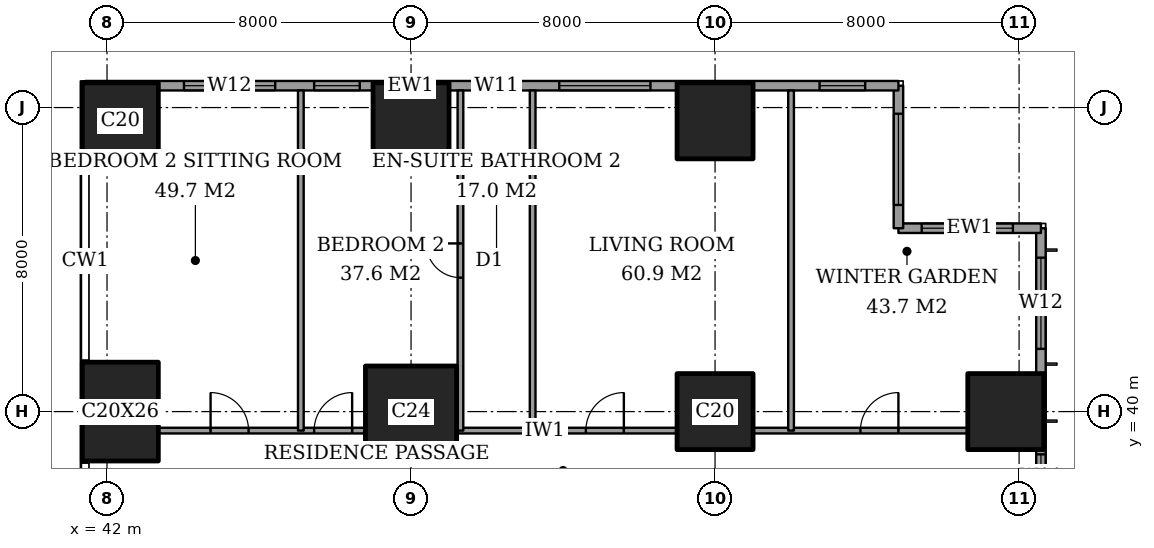
"""IFC4 building model, lengths in metres.
Left out: names, types, materials, properties, quantities, classifications, styles, units other than length and angle.
Written with IfcOpenShell. Run it as: python <this file> out.ifc"""

import sys

from ifc_helpers import new_model, si_unit, direction, frame, frame_2d, origin, origin_2d, place, context, subcontext, project, spatial, rectangle, extrude, element, fill, save


model = new_model("IFC4")
c1 = context("Model", 3, precision=1e-05, world=origin(), true_north=direction((0.0, 1.0)))
c2 = subcontext(c1, "Body", "Model", "MODEL_VIEW")
j1 = project(units=[si_unit("LENGTHUNIT", "METRE"), si_unit("PLANEANGLEUNIT", "RADIAN")], contexts=[c1])
p1 = place(None, origin())
s1 = spatial("IfcSite", under=j1, at=p1, CompositionType="ELEMENT")
p2 = place(p1, origin())
s2 = spatial("IfcBuilding", under=s1, at=p2, CompositionType="ELEMENT")
p3 = place(p2, frame((0.0, 0.0, 103.4)))
s3 = spatial("IfcBuildingStorey", under=s2, at=p3, CompositionType="ELEMENT", Elevation=103.4)
p4 = place(p3, frame((42.35, 40.0, 0.0), z_axis=(0.0, 0.0, 1.0), x_axis=(1.0, 0.0, 0.0)))
e1 = element("IfcColumn", 1, at=p4, inside=s3, PredefinedType="COLUMN", context=c2, shape_type="SweptSolid", body=[
    extrude(rectangle(XDim=2.0, YDim=2.6, at=origin_2d()), origin(), (0.0, 0.0, 1.0), 3.6),
])
p5 = place(p3, frame((42.35, 47.65, 0.0), z_axis=(0.0, 0.0, 1.0), x_axis=(1.0, 0.0, 0.0)))
e2 = element("IfcColumn", 2, at=p5, inside=s3, PredefinedType="COLUMN", context=c2, shape_type="SweptSolid", body=[
    extrude(rectangle(XDim=2.0, YDim=2.0, at=origin_2d()), origin(), (0.0, 0.0, 1.0), 3.6),
])
p6 = place(p3, frame((50.0, 40.0, 0.0), z_axis=(0.0, 0.0, 1.0), x_axis=(1.0, 0.0, 0.0)))
e3 = element("IfcColumn", 3, at=p6, inside=s3, PredefinedType="COLUMN", context=c2, shape_type="SweptSolid", body=[
    extrude(rectangle(XDim=2.4, YDim=2.4, at=origin_2d()), origin(), (0.0, 0.0, 1.0), 3.6),
])
for number, where, z_axis, x_axis in (
    (4, (50.0, 47.65, 0.0), (0.0, 0.0, 1.0), (1.0, 0.0, 0.0)),
    (5, (58.0, 40.0, 0.0), (0.0, 0.0, 1.0), (1.0, 0.0, 0.0)),
    (6, (58.0, 47.65, 0.0), (0.0, 0.0, 1.0), (1.0, 0.0, 0.0)),
    (7, (65.65, 40.0, 0.0), (0.0, 0.0, 1.0), (1.0, 0.0, 0.0)),
):
    element("IfcColumn", number, at=place(p3, frame(where, z_axis=z_axis, x_axis=x_axis)), inside=s3, PredefinedType="COLUMN", context=c2, shape_type="SweptSolid", body=[
        extrude(rectangle(XDim=2.0, YDim=2.0, at=origin_2d()), origin(), (0.0, 0.0, 1.0), 3.6),
    ])
p7 = place(p3, frame((66.575, 3.175, 0.0), z_axis=(0.0, 0.0, 1.0), x_axis=(0.0, 1.0, 0.0)))
e8 = element("IfcWall", 8, at=p7, inside=s3, PredefinedType="SOLIDWALL", context=c2, shape_type="SweptSolid", body=[
    extrude(rectangle(XDim=41.65, YDim=0.25, at=frame_2d((20.825, 0.0))), origin(), (0.0, 0.0, 1.0), 3.6),
])
p8 = place(p7, frame((0.775, 0.0, 0.4)))
e9 = element("IfcOpeningElement", 9, at=p8, cuts=e8, PredefinedType="OPENING", context=c2, shape_type="SweptSolid", body=[
    extrude(rectangle(XDim=2.4, YDim=2.2, at=frame_2d((1.2, 1.1))), frame((0.0, 0.135, 0.0), z_axis=(0.0, -1.0, 0.0), x_axis=(1.0, 0.0, 0.0)), (0.0, 0.0, 1.0), 0.27),
])
p9 = place(p7, frame((6.1, 0.0, 0.4)))
e10 = element("IfcOpeningElement", 10, at=p9, cuts=e8, PredefinedType="OPENING", context=c2, shape_type="SweptSolid", body=[
    extrude(rectangle(XDim=1.2, YDim=2.2, at=frame_2d((0.6, 1.1))), frame((0.0, 0.135, 0.0), z_axis=(0.0, -1.0, 0.0), x_axis=(1.0, 0.0, 0.0)), (0.0, 0.0, 1.0), 0.27),
])
p10 = place(p7, frame((8.275, 0.0, 0.4)))
e11 = element("IfcOpeningElement", 11, at=p10, cuts=e8, PredefinedType="OPENING", context=c2, shape_type="SweptSolid", body=[
    extrude(rectangle(XDim=2.4, YDim=2.2, at=frame_2d((1.2, 1.1))), frame((0.0, 0.135, 0.0), z_axis=(0.0, -1.0, 0.0), x_axis=(1.0, 0.0, 0.0)), (0.0, 0.0, 1.0), 0.27),
])
p11 = place(p7, frame((15.775, 0.0, 0.4)))
e12 = element("IfcOpeningElement", 12, at=p11, cuts=e8, PredefinedType="OPENING", context=c2, shape_type="SweptSolid", body=[
    extrude(rectangle(XDim=2.4, YDim=2.2, at=frame_2d((1.2, 1.1))), frame((0.0, 0.135, 0.0), z_axis=(0.0, -1.0, 0.0), x_axis=(1.0, 0.0, 0.0)), (0.0, 0.0, 1.0), 0.27),
])
p12 = place(p7, frame((23.475, 0.0, 0.4)))
e13 = element("IfcOpeningElement", 13, at=p12, cuts=e8, PredefinedType="OPENING", context=c2, shape_type="SweptSolid", body=[
    extrude(rectangle(XDim=2.4, YDim=2.2, at=frame_2d((1.2, 1.1))), frame((0.0, 0.135, 0.0), z_axis=(0.0, -1.0, 0.0), x_axis=(1.0, 0.0, 0.0)), (0.0, 0.0, 1.0), 0.27),
])
p13 = place(p7, frame((30.975, 0.0, 0.4)))
e14 = element("IfcOpeningElement", 14, at=p13, cuts=e8, PredefinedType="OPENING", context=c2, shape_type="SweptSolid", body=[
    extrude(rectangle(XDim=2.4, YDim=2.2, at=frame_2d((1.2, 1.1))), frame((0.0, 0.135, 0.0), z_axis=(0.0, -1.0, 0.0), x_axis=(1.0, 0.0, 0.0)), (0.0, 0.0, 1.0), 0.27),
])
p14 = place(p7, frame((34.5, 0.0, 0.4)))
e15 = element("IfcOpeningElement", 15, at=p14, cuts=e8, PredefinedType="OPENING", context=c2, shape_type="SweptSolid", body=[
    extrude(rectangle(XDim=1.2, YDim=2.2, at=frame_2d((0.6, 1.1))), frame((0.0, 0.135, 0.0), z_axis=(0.0, -1.0, 0.0), x_axis=(1.0, 0.0, 0.0)), (0.0, 0.0, 1.0), 0.27),
])
p15 = place(p7, frame((38.475, 0.0, 0.4)))
e16 = element("IfcOpeningElement", 16, at=p15, cuts=e8, PredefinedType="OPENING", context=c2, shape_type="SweptSolid", body=[
    extrude(rectangle(XDim=2.4, YDim=2.2, at=frame_2d((1.2, 1.1))), frame((0.0, 0.135, 0.0), z_axis=(0.0, -1.0, 0.0), x_axis=(1.0, 0.0, 0.0)), (0.0, 0.0, 1.0), 0.27),
])
p16 = place(p3, frame((66.575, 44.825, 0.0), z_axis=(0.0, 0.0, 1.0), x_axis=(-1.0, 0.0, 0.0)))
e17 = element("IfcWall", 17, at=p16, inside=s3, PredefinedType="SOLIDWALL", context=c2, shape_type="SweptSolid", body=[
    extrude(rectangle(XDim=3.75, YDim=0.25, at=frame_2d((1.875, 0.0))), origin(), (0.0, 0.0, 1.0), 3.6),
])
p17 = place(p16, frame((0.738, 0.0, 0.4)))
e18 = element("IfcOpeningElement", 18, at=p17, cuts=e17, PredefinedType="OPENING", context=c2, shape_type="SweptSolid", body=[
    extrude(rectangle(XDim=2.4, YDim=2.2, at=frame_2d((1.2, 1.1))), frame((0.0, 0.135, 0.0), z_axis=(0.0, -1.0, 0.0), x_axis=(1.0, 0.0, 0.0)), (0.0, 0.0, 1.0), 0.27),
])
p18 = place(p3, frame((62.825, 44.825, 0.0), z_axis=(0.0, 0.0, 1.0), x_axis=(0.0, 1.0, 0.0)))
e19 = element("IfcWall", 19, at=p18, inside=s3, PredefinedType="SOLIDWALL", context=c2, shape_type="SweptSolid", body=[
    extrude(rectangle(XDim=3.75, YDim=0.25, at=frame_2d((1.875, 0.0))), origin(), (0.0, 0.0, 1.0), 3.6),
])
p19 = place(p18, frame((0.613, 0.0, 0.4)))
e20 = element("IfcOpeningElement", 20, at=p19, cuts=e19, PredefinedType="OPENING", context=c2, shape_type="SweptSolid", body=[
    extrude(rectangle(XDim=2.4, YDim=2.2, at=frame_2d((1.2, 1.1))), frame((0.0, 0.135, 0.0), z_axis=(0.0, -1.0, 0.0), x_axis=(1.0, 0.0, 0.0)), (0.0, 0.0, 1.0), 0.27),
])
p20 = place(p3, frame((62.825, 48.575, 0.0), z_axis=(0.0, 0.0, 1.0), x_axis=(-1.0, 0.0, 0.0)))
e21 = element("IfcWall", 21, at=p20, inside=s3, PredefinedType="SOLIDWALL", context=c2, shape_type="SweptSolid", body=[
    extrude(rectangle(XDim=21.4, YDim=0.25, at=frame_2d((10.7, 0.0))), origin(), (0.0, 0.0, 1.0), 3.6),
])
p21 = place(p20, frame((0.875, 0.0, 0.4)))
e22 = element("IfcOpeningElement", 22, at=p21, cuts=e21, PredefinedType="OPENING", context=c2, shape_type="SweptSolid", body=[
    extrude(rectangle(XDim=1.2, YDim=2.2, at=frame_2d((0.6, 1.1))), frame((0.0, 0.135, 0.0), z_axis=(0.0, -1.0, 0.0), x_axis=(1.0, 0.0, 0.0)), (0.0, 0.0, 1.0), 0.27),
])
p22 = place(p20, frame((6.525, 0.0, 0.4)))
e23 = element("IfcOpeningElement", 23, at=p22, cuts=e21, PredefinedType="OPENING", context=c2, shape_type="SweptSolid", body=[
    extrude(rectangle(XDim=2.4, YDim=2.2, at=frame_2d((1.2, 1.1))), frame((0.0, 0.135, 0.0), z_axis=(0.0, -1.0, 0.0), x_axis=(1.0, 0.0, 0.0)), (0.0, 0.0, 1.0), 0.27),
])
p23 = place(p20, frame((9.975, 0.0, 0.4)))
e24 = element("IfcOpeningElement", 24, at=p23, cuts=e21, PredefinedType="OPENING", context=c2, shape_type="SweptSolid", body=[
    extrude(rectangle(XDim=1.2, YDim=2.2, at=frame_2d((0.6, 1.1))), frame((0.0, 0.135, 0.0), z_axis=(0.0, -1.0, 0.0), x_axis=(1.0, 0.0, 0.0)), (0.0, 0.0, 1.0), 0.27),
])
p24 = place(p20, frame((14.175, 0.0, 0.4)))
e25 = element("IfcOpeningElement", 25, at=p24, cuts=e21, PredefinedType="OPENING", context=c2, shape_type="SweptSolid", body=[
    extrude(rectangle(XDim=1.2, YDim=2.2, at=frame_2d((0.6, 1.1))), frame((0.0, 0.135, 0.0), z_axis=(0.0, -1.0, 0.0), x_axis=(1.0, 0.0, 0.0)), (0.0, 0.0, 1.0), 0.27),
])
p25 = place(p20, frame((16.4, 0.0, 0.4)))
e26 = element("IfcOpeningElement", 26, at=p25, cuts=e21, PredefinedType="OPENING", context=c2, shape_type="SweptSolid", body=[
    extrude(rectangle(XDim=2.4, YDim=2.2, at=frame_2d((1.2, 1.1))), frame((0.0, 0.135, 0.0), z_axis=(0.0, -1.0, 0.0), x_axis=(1.0, 0.0, 0.0)), (0.0, 0.0, 1.0), 0.27),
])
p26 = place(p3, frame((43.35, 39.5, 0.0), z_axis=(0.0, 0.0, 1.0), x_axis=(1.0, 0.0, 0.0)))
e27 = element("IfcWall", 27, at=p26, inside=s3, PredefinedType="PARTITIONING", context=c2, shape_type="SweptSolid", body=[
    extrude(rectangle(XDim=5.45, YDim=0.15, at=frame_2d((2.725, 0.0))), origin(), (0.0, 0.0, 1.0), 3.35),
])
p27 = place(p26, frame((4.1, 0.0, 0.0)))
e28 = element("IfcOpeningElement", 28, at=p27, cuts=e27, PredefinedType="OPENING", context=c2, shape_type="SweptSolid", body=[
    extrude(rectangle(XDim=1.0, YDim=2.1, at=frame_2d((0.5, 1.05))), frame((0.0, 0.085, 0.0), z_axis=(0.0, -1.0, 0.0), x_axis=(1.0, 0.0, 0.0)), (0.0, 0.0, 1.0), 0.17),
])
p28 = place(p26, frame((1.375, 0.0, 0.0)))
e29 = element("IfcOpeningElement", 29, at=p28, cuts=e27, PredefinedType="OPENING", context=c2, shape_type="SweptSolid", body=[
    extrude(rectangle(XDim=1.0, YDim=2.1, at=frame_2d((0.5, 1.05))), frame((0.0, 0.085, 0.0), z_axis=(0.0, -1.0, 0.0), x_axis=(1.0, 0.0, 0.0)), (0.0, 0.0, 1.0), 0.17),
])
p29 = place(p3, frame((51.2, 39.5, 0.0), z_axis=(0.0, 0.0, 1.0), x_axis=(1.0, 0.0, 0.0)))
e30 = element("IfcWall", 30, at=p29, inside=s3, PredefinedType="PARTITIONING", context=c2, shape_type="SweptSolid", body=[
    extrude(rectangle(XDim=5.8, YDim=0.15, at=frame_2d((2.9, 0.0))), origin(), (0.0, 0.0, 1.0), 3.35),
])
p30 = place(p29, frame((3.4, 0.0, 0.0)))
e31 = element("IfcOpeningElement", 31, at=p30, cuts=e30, PredefinedType="OPENING", context=c2, shape_type="SweptSolid", body=[
    extrude(rectangle(XDim=1.0, YDim=2.1, at=frame_2d((0.5, 1.05))), frame((0.0, 0.085, 0.0), z_axis=(0.0, -1.0, 0.0), x_axis=(1.0, 0.0, 0.0)), (0.0, 0.0, 1.0), 0.17),
])
p31 = place(p3, frame((59.0, 39.5, 0.0), z_axis=(0.0, 0.0, 1.0), x_axis=(1.0, 0.0, 0.0)))
e32 = element("IfcWall", 32, at=p31, inside=s3, PredefinedType="PARTITIONING", context=c2, shape_type="SweptSolid", body=[
    extrude(rectangle(XDim=5.65, YDim=0.15, at=frame_2d((2.825, 0.0))), origin(), (0.0, 0.0, 1.0), 3.35),
])
p32 = place(p31, frame((2.825, 0.0, 0.0)))
e33 = element("IfcOpeningElement", 33, at=p32, cuts=e32, PredefinedType="OPENING", context=c2, shape_type="SweptSolid", body=[
    extrude(rectangle(XDim=1.0, YDim=2.1, at=frame_2d((0.5, 1.05))), frame((0.0, 0.085, 0.0), z_axis=(0.0, -1.0, 0.0), x_axis=(1.0, 0.0, 0.0)), (0.0, 0.0, 1.0), 0.17),
])
p33 = place(p3, frame((47.1, 39.5, 0.0), z_axis=(0.0, 0.0, 1.0), x_axis=(0.0, 1.0, 0.0)))
e34 = element("IfcWall", 34, at=p33, inside=s3, PredefinedType="PARTITIONING", context=c2, shape_type="SweptSolid", body=[
    extrude(rectangle(XDim=8.95, YDim=0.15, at=frame_2d((4.475, 0.0))), origin(), (0.0, 0.0, 1.0), 3.35),
])
p34 = place(p3, frame((51.3, 39.5, 0.0), z_axis=(0.0, 0.0, 1.0), x_axis=(0.0, 1.0, 0.0)))
e35 = element("IfcWall", 35, at=p34, inside=s3, PredefinedType="PARTITIONING", context=c2, shape_type="SweptSolid", body=[
    extrude(rectangle(XDim=8.95, YDim=0.15, at=frame_2d((4.475, 0.0))), origin(), (0.0, 0.0, 1.0), 3.35),
])
p35 = place(p34, frame((4.025, 0.0, 0.0)))
e36 = element("IfcOpeningElement", 36, at=p35, cuts=e35, PredefinedType="OPENING", context=c2, shape_type="SweptSolid", body=[
    extrude(rectangle(XDim=0.9, YDim=2.1, at=frame_2d((0.45, 1.05))), frame((0.0, 0.085, 0.0), z_axis=(0.0, -1.0, 0.0), x_axis=(1.0, 0.0, 0.0)), (0.0, 0.0, 1.0), 0.17),
])
for number, where, z_axis, x_axis in (
    (37, (53.2, 39.5, 0.0), (0.0, 0.0, 1.0), (0.0, 1.0, 0.0)),
    (38, (60.0, 39.5, 0.0), (0.0, 0.0, 1.0), (0.0, 1.0, 0.0)),
):
    element("IfcWall", number, at=place(p3, frame(where, z_axis=z_axis, x_axis=x_axis)), inside=s3, PredefinedType="PARTITIONING", context=c2, shape_type="SweptSolid", body=[
        extrude(rectangle(XDim=8.95, YDim=0.15, at=frame_2d((4.475, 0.0))), origin(), (0.0, 0.0, 1.0), 3.35),
    ])
p36 = place(p14, origin())
e39 = element("IfcWindow", 39, at=p36, inside=s3, PartitioningType="SINGLE_PANEL", PredefinedType="WINDOW", context=c2, shape_type="SweptSolid", body=[
    extrude(rectangle(XDim=1.2, YDim=2.2, at=frame_2d((0.6, 1.1))), frame((0.0, 0.03, 0.0), z_axis=(0.0, -1.0, 0.0), x_axis=(1.0, 0.0, 0.0)), (0.0, 0.0, 1.0), 0.06),
])
fill(e15, e39)
p37 = place(p15, origin())
e40 = element("IfcWindow", 40, at=p37, inside=s3, PartitioningType="SINGLE_PANEL", PredefinedType="WINDOW", context=c2, shape_type="SweptSolid", body=[
    extrude(rectangle(XDim=2.4, YDim=2.2, at=frame_2d((1.2, 1.1))), frame((0.0, 0.03, 0.0), z_axis=(0.0, -1.0, 0.0), x_axis=(1.0, 0.0, 0.0)), (0.0, 0.0, 1.0), 0.06),
])
fill(e16, e40)
p38 = place(p17, origin())
e41 = element("IfcWindow", 41, at=p38, inside=s3, PartitioningType="SINGLE_PANEL", PredefinedType="WINDOW", context=c2, shape_type="SweptSolid", body=[
    extrude(rectangle(XDim=2.4, YDim=2.2, at=frame_2d((1.2, 1.1))), frame((0.0, 0.03, 0.0), z_axis=(0.0, -1.0, 0.0), x_axis=(1.0, 0.0, 0.0)), (0.0, 0.0, 1.0), 0.06),
])
fill(e18, e41)
p39 = place(p19, origin())
e42 = element("IfcWindow", 42, at=p39, inside=s3, PartitioningType="SINGLE_PANEL", PredefinedType="WINDOW", context=c2, shape_type="SweptSolid", body=[
    extrude(rectangle(XDim=2.4, YDim=2.2, at=frame_2d((1.2, 1.1))), frame((0.0, 0.03, 0.0), z_axis=(0.0, -1.0, 0.0), x_axis=(1.0, 0.0, 0.0)), (0.0, 0.0, 1.0), 0.06),
])
fill(e20, e42)
p40 = place(p21, origin())
e43 = element("IfcWindow", 43, at=p40, inside=s3, PartitioningType="SINGLE_PANEL", PredefinedType="WINDOW", context=c2, shape_type="SweptSolid", body=[
    extrude(rectangle(XDim=1.2, YDim=2.2, at=frame_2d((0.6, 1.1))), frame((0.0, 0.03, 0.0), z_axis=(0.0, -1.0, 0.0), x_axis=(1.0, 0.0, 0.0)), (0.0, 0.0, 1.0), 0.06),
])
fill(e22, e43)
p41 = place(p22, origin())
e44 = element("IfcWindow", 44, at=p41, inside=s3, PartitioningType="SINGLE_PANEL", PredefinedType="WINDOW", context=c2, shape_type="SweptSolid", body=[
    extrude(rectangle(XDim=2.4, YDim=2.2, at=frame_2d((1.2, 1.1))), frame((0.0, 0.03, 0.0), z_axis=(0.0, -1.0, 0.0), x_axis=(1.0, 0.0, 0.0)), (0.0, 0.0, 1.0), 0.06),
])
fill(e23, e44)
p42 = place(p23, origin())
e45 = element("IfcWindow", 45, at=p42, inside=s3, PartitioningType="SINGLE_PANEL", PredefinedType="WINDOW", context=c2, shape_type="SweptSolid", body=[
    extrude(rectangle(XDim=1.2, YDim=2.2, at=frame_2d((0.6, 1.1))), frame((0.0, 0.03, 0.0), z_axis=(0.0, -1.0, 0.0), x_axis=(1.0, 0.0, 0.0)), (0.0, 0.0, 1.0), 0.06),
])
fill(e24, e45)
p43 = place(p24, origin())
e46 = element("IfcWindow", 46, at=p43, inside=s3, PartitioningType="SINGLE_PANEL", PredefinedType="WINDOW", context=c2, shape_type="SweptSolid", body=[
    extrude(rectangle(XDim=1.2, YDim=2.2, at=frame_2d((0.6, 1.1))), frame((0.0, 0.03, 0.0), z_axis=(0.0, -1.0, 0.0), x_axis=(1.0, 0.0, 0.0)), (0.0, 0.0, 1.0), 0.06),
])
fill(e25, e46)
p44 = place(p25, origin())
e47 = element("IfcWindow", 47, at=p44, inside=s3, PartitioningType="SINGLE_PANEL", PredefinedType="WINDOW", context=c2, shape_type="SweptSolid", body=[
    extrude(rectangle(XDim=2.4, YDim=2.2, at=frame_2d((1.2, 1.1))), frame((0.0, 0.03, 0.0), z_axis=(0.0, -1.0, 0.0), x_axis=(1.0, 0.0, 0.0)), (0.0, 0.0, 1.0), 0.06),
])
fill(e26, e47)
p45 = place(p32, origin())
e48 = element("IfcDoor", 48, at=p45, inside=s3, OperationType="SINGLE_SWING_LEFT", PredefinedType="DOOR", context=c2, shape_type="SweptSolid", body=[
    extrude(rectangle(XDim=1.0, YDim=2.1, at=frame_2d((0.5, 1.05))), frame((0.0, 0.025, 0.0), z_axis=(0.0, -1.0, 0.0), x_axis=(1.0, 0.0, 0.0)), (0.0, 0.0, 1.0), 0.05),
])
fill(e33, e48)
p46 = place(p30, origin())
e49 = element("IfcDoor", 49, at=p46, inside=s3, OperationType="SINGLE_SWING_LEFT", PredefinedType="DOOR", context=c2, shape_type="SweptSolid", body=[
    extrude(rectangle(XDim=1.0, YDim=2.1, at=frame_2d((0.5, 1.05))), frame((0.0, 0.025, 0.0), z_axis=(0.0, -1.0, 0.0), x_axis=(1.0, 0.0, 0.0)), (0.0, 0.0, 1.0), 0.05),
])
fill(e31, e49)
p47 = place(p35, origin())
e50 = element("IfcDoor", 50, at=p47, inside=s3, OperationType="SINGLE_SWING_LEFT", PredefinedType="DOOR", context=c2, shape_type="SweptSolid", body=[
    extrude(rectangle(XDim=0.9, YDim=2.1, at=frame_2d((0.45, 1.05))), frame((0.0, 0.025, 0.0), z_axis=(0.0, -1.0, 0.0), x_axis=(1.0, 0.0, 0.0)), (0.0, 0.0, 1.0), 0.05),
])
fill(e36, e50)
p48 = place(p27, origin())
e51 = element("IfcDoor", 51, at=p48, inside=s3, OperationType="SINGLE_SWING_LEFT", PredefinedType="DOOR", context=c2, shape_type="SweptSolid", body=[
    extrude(rectangle(XDim=1.0, YDim=2.1, at=frame_2d((0.5, 1.05))), frame((0.0, 0.025, 0.0), z_axis=(0.0, -1.0, 0.0), x_axis=(1.0, 0.0, 0.0)), (0.0, 0.0, 1.0), 0.05),
])
fill(e28, e51)
p49 = place(p28, origin())
e52 = element("IfcDoor", 52, at=p49, inside=s3, OperationType="SINGLE_SWING_RIGHT", PredefinedType="DOOR", context=c2, shape_type="SweptSolid", body=[
    extrude(rectangle(XDim=1.0, YDim=2.1, at=frame_2d((0.5, 1.05))), frame((0.0, 0.025, 0.0), z_axis=(0.0, -1.0, 0.0), x_axis=(1.0, 0.0, 0.0)), (0.0, 0.0, 1.0), 0.05),
])
fill(e29, e52)
save(model, sys.argv[1])
